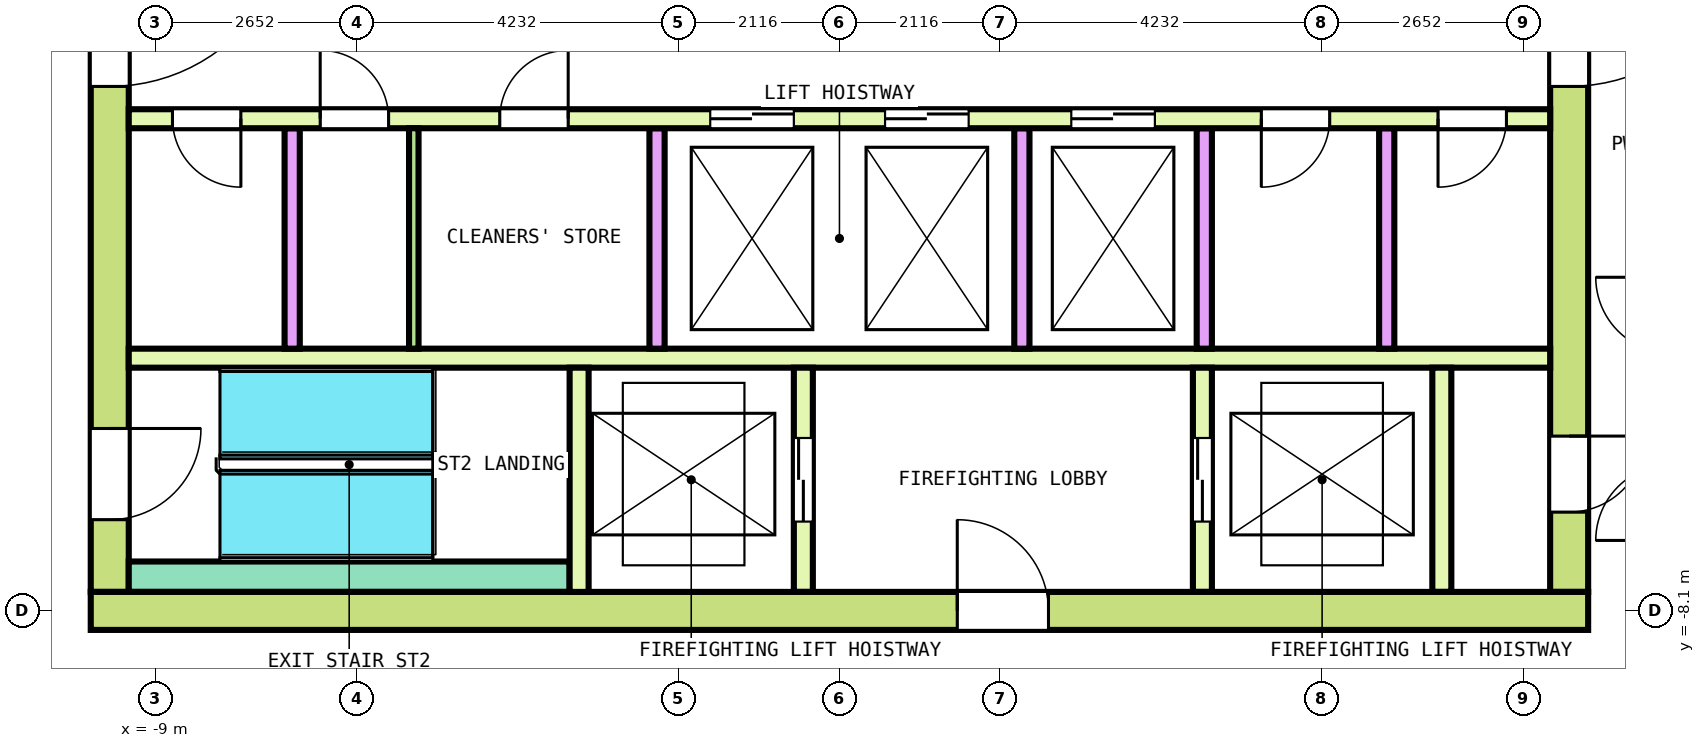
"""IFC4 building model, lengths in metres.
Left out: names, types, materials, properties, quantities, classifications, styles, units other than length and angle.
Written with IfcOpenShell. Run it as: python <this file> out.ifc"""

import sys

from ifc_helpers import new_model, si_unit, direction, frame, frame_2d, origin, place, context, subcontext, project, spatial, rectangle, extrude, element, fill, save


model = new_model("IFC4")
c1 = context("Model", 3, precision=1e-05, world=origin(), true_north=direction((0.0, 1.0)))
c2 = subcontext(c1, "Body", "Model", "MODEL_VIEW")
j1 = project(units=[si_unit("LENGTHUNIT", "METRE"), si_unit("PLANEANGLEUNIT", "RADIAN")], contexts=[c1])
p1 = place(None, origin())
s1 = spatial("IfcSite", under=j1, at=p1, CompositionType="ELEMENT")
p2 = place(p1, origin())
s2 = spatial("IfcBuilding", under=s1, at=p2, CompositionType="ELEMENT")
p3 = place(p2, frame((0.0, 0.0, 267.0)))
s3 = spatial("IfcBuildingStorey", under=s2, at=p3, CompositionType="ELEMENT", Elevation=267.0)
p4 = place(p3, frame((-9.85, -8.1, 0.0), z_axis=(0.0, 0.0, 1.0), x_axis=(1.0, 0.0, 0.0)))
e1 = element("IfcWall", 1, at=p4, inside=s3, PredefinedType="SHEAR", context=c2, shape_type="SweptSolid", body=[
    extrude(rectangle(XDim=19.7, YDim=0.5, at=frame_2d((9.85, 0.0))), origin(), (0.0, 0.0, 1.0), 3.7),
])
p5 = place(p4, frame((11.4, 0.0, 0.0)))
e2 = element("IfcOpeningElement", 2, at=p5, cuts=e1, PredefinedType="OPENING", context=c2, shape_type="SweptSolid", body=[
    extrude(rectangle(XDim=1.2, YDim=2.1, at=frame_2d((0.6, 1.05))), frame((0.0, 0.26, 0.0), z_axis=(0.0, -1.0, 0.0), x_axis=(1.0, 0.0, 0.0)), (0.0, 0.0, 1.0), 0.52),
])
p6 = place(p3, frame((-9.6, -7.85, 0.0), z_axis=(0.0, 0.0, 1.0), x_axis=(0.0, 1.0, 0.0)))
e3 = element("IfcWall", 3, at=p6, inside=s3, PredefinedType="SHEAR", context=c2, shape_type="SweptSolid", body=[
    extrude(rectangle(XDim=15.7, YDim=0.5, at=frame_2d((7.85, 0.0))), origin(), (0.0, 0.0, 1.0), 3.7),
])
p7 = place(p6, frame((6.65, 0.0, 0.0)))
e4 = element("IfcOpeningElement", 4, at=p7, cuts=e3, PredefinedType="OPENING", context=c2, shape_type="SweptSolid", body=[
    extrude(rectangle(XDim=2.4, YDim=2.1, at=frame_2d((1.2, 1.05))), frame((0.0, 0.26, 0.0), z_axis=(0.0, -1.0, 0.0), x_axis=(1.0, 0.0, 0.0)), (0.0, 0.0, 1.0), 0.52),
])
p8 = place(p6, frame((13.55, 0.0, 0.0)))
e5 = element("IfcOpeningElement", 5, at=p8, cuts=e3, PredefinedType="OPENING", context=c2, shape_type="SweptSolid", body=[
    extrude(rectangle(XDim=1.2, YDim=2.1, at=frame_2d((0.6, 1.05))), frame((0.0, 0.26, 0.0), z_axis=(0.0, -1.0, 0.0), x_axis=(1.0, 0.0, 0.0)), (0.0, 0.0, 1.0), 0.52),
])
p9 = place(p6, frame((0.95, 0.0, 0.0)))
e6 = element("IfcOpeningElement", 6, at=p9, cuts=e3, PredefinedType="OPENING", context=c2, shape_type="SweptSolid", body=[
    extrude(rectangle(XDim=1.2, YDim=2.1, at=frame_2d((0.6, 1.05))), frame((0.0, 0.26, 0.0), z_axis=(0.0, -1.0, 0.0), x_axis=(1.0, 0.0, 0.0)), (0.0, 0.0, 1.0), 0.52),
])
p10 = place(p3, frame((9.6, -7.85, 0.0), z_axis=(0.0, 0.0, 1.0), x_axis=(0.0, 1.0, 0.0)))
e7 = element("IfcWall", 7, at=p10, inside=s3, PredefinedType="SHEAR", context=c2, shape_type="SweptSolid", body=[
    extrude(rectangle(XDim=15.7, YDim=0.5, at=frame_2d((7.85, 0.0))), origin(), (0.0, 0.0, 1.0), 3.7),
])
p11 = place(p10, frame((6.65, 0.0, 0.0)))
e8 = element("IfcOpeningElement", 8, at=p11, cuts=e7, PredefinedType="OPENING", context=c2, shape_type="SweptSolid", body=[
    extrude(rectangle(XDim=2.4, YDim=2.1, at=frame_2d((1.2, 1.05))), frame((0.0, 0.26, 0.0), z_axis=(0.0, -1.0, 0.0), x_axis=(1.0, 0.0, 0.0)), (0.0, 0.0, 1.0), 0.52),
])
p12 = place(p10, frame((13.55, 0.0, 0.0)))
e9 = element("IfcOpeningElement", 9, at=p12, cuts=e7, PredefinedType="OPENING", context=c2, shape_type="SweptSolid", body=[
    extrude(rectangle(XDim=1.2, YDim=2.1, at=frame_2d((0.6, 1.05))), frame((0.0, 0.26, 0.0), z_axis=(0.0, -1.0, 0.0), x_axis=(1.0, 0.0, 0.0)), (0.0, 0.0, 1.0), 0.52),
])
p13 = place(p10, frame((1.05, 0.0, 0.0)))
e10 = element("IfcOpeningElement", 10, at=p13, cuts=e7, PredefinedType="OPENING", context=c2, shape_type="SweptSolid", body=[
    extrude(rectangle(XDim=1.0, YDim=2.1, at=frame_2d((0.5, 1.05))), frame((0.0, 0.26, 0.0), z_axis=(0.0, -1.0, 0.0), x_axis=(1.0, 0.0, 0.0)), (0.0, 0.0, 1.0), 0.52),
])
p14 = place(p3, frame((-9.35, -1.625, 0.0), z_axis=(0.0, 0.0, 1.0), x_axis=(1.0, 0.0, 0.0)))
e11 = element("IfcWall", 11, at=p14, inside=s3, PredefinedType="SOLIDWALL", context=c2, shape_type="SweptSolid", body=[
    extrude(rectangle(XDim=18.7, YDim=0.25, at=frame_2d((9.35, 0.0))), origin(), (0.0, 0.0, 1.0), 3.7),
])
p15 = place(p14, frame((7.65, 0.0, 0.0)))
e12 = element("IfcOpeningElement", 12, at=p15, cuts=e11, PredefinedType="OPENING", context=c2, shape_type="SweptSolid", body=[
    extrude(rectangle(XDim=1.1, YDim=2.1, at=frame_2d((0.55, 1.05))), frame((0.0, 0.135, 0.0), z_axis=(0.0, -1.0, 0.0), x_axis=(1.0, 0.0, 0.0)), (0.0, 0.0, 1.0), 0.27),
])
p16 = place(p14, frame((9.95, 0.0, 0.0)))
e13 = element("IfcOpeningElement", 13, at=p16, cuts=e11, PredefinedType="OPENING", context=c2, shape_type="SweptSolid", body=[
    extrude(rectangle(XDim=1.1, YDim=2.1, at=frame_2d((0.55, 1.05))), frame((0.0, 0.135, 0.0), z_axis=(0.0, -1.0, 0.0), x_axis=(1.0, 0.0, 0.0)), (0.0, 0.0, 1.0), 0.27),
])
p17 = place(p14, frame((12.4, 0.0, 0.0)))
e14 = element("IfcOpeningElement", 14, at=p17, cuts=e11, PredefinedType="OPENING", context=c2, shape_type="SweptSolid", body=[
    extrude(rectangle(XDim=1.1, YDim=2.1, at=frame_2d((0.55, 1.05))), frame((0.0, 0.135, 0.0), z_axis=(0.0, -1.0, 0.0), x_axis=(1.0, 0.0, 0.0)), (0.0, 0.0, 1.0), 0.27),
])
p18 = place(p14, frame((0.575, 0.0, 0.0)))
e15 = element("IfcOpeningElement", 15, at=p18, cuts=e11, PredefinedType="OPENING", context=c2, shape_type="SweptSolid", body=[
    extrude(rectangle(XDim=0.9, YDim=2.1, at=frame_2d((0.45, 1.05))), frame((0.0, 0.135, 0.0), z_axis=(0.0, -1.0, 0.0), x_axis=(1.0, 0.0, 0.0)), (0.0, 0.0, 1.0), 0.27),
])
p19 = place(p14, frame((2.519, 0.0, 0.0)))
e16 = element("IfcOpeningElement", 16, at=p19, cuts=e11, PredefinedType="OPENING", context=c2, shape_type="SweptSolid", body=[
    extrude(rectangle(XDim=0.9, YDim=2.1, at=frame_2d((0.45, 1.05))), frame((0.0, 0.135, 0.0), z_axis=(0.0, -1.0, 0.0), x_axis=(1.0, 0.0, 0.0)), (0.0, 0.0, 1.0), 0.27),
])
p20 = place(p14, frame((4.881, 0.0, 0.0)))
e17 = element("IfcOpeningElement", 17, at=p20, cuts=e11, PredefinedType="OPENING", context=c2, shape_type="SweptSolid", body=[
    extrude(rectangle(XDim=0.9, YDim=2.1, at=frame_2d((0.45, 1.05))), frame((0.0, 0.135, 0.0), z_axis=(0.0, -1.0, 0.0), x_axis=(1.0, 0.0, 0.0)), (0.0, 0.0, 1.0), 0.27),
])
p21 = place(p14, frame((14.9, 0.0, 0.0)))
e18 = element("IfcOpeningElement", 18, at=p21, cuts=e11, PredefinedType="OPENING", context=c2, shape_type="SweptSolid", body=[
    extrude(rectangle(XDim=0.9, YDim=2.1, at=frame_2d((0.45, 1.05))), frame((0.0, 0.135, 0.0), z_axis=(0.0, -1.0, 0.0), x_axis=(1.0, 0.0, 0.0)), (0.0, 0.0, 1.0), 0.27),
])
p22 = place(p14, frame((17.225, 0.0, 0.0)))
e19 = element("IfcOpeningElement", 19, at=p22, cuts=e11, PredefinedType="OPENING", context=c2, shape_type="SweptSolid", body=[
    extrude(rectangle(XDim=0.9, YDim=2.1, at=frame_2d((0.45, 1.05))), frame((0.0, 0.135, 0.0), z_axis=(0.0, -1.0, 0.0), x_axis=(1.0, 0.0, 0.0)), (0.0, 0.0, 1.0), 0.27),
])
p23 = place(p3, frame((-9.35, -4.775, 0.0), z_axis=(0.0, 0.0, 1.0), x_axis=(1.0, 0.0, 0.0)))
e20 = element("IfcWall", 20, at=p23, inside=s3, PredefinedType="SOLIDWALL", context=c2, shape_type="SweptSolid", body=[
    extrude(rectangle(XDim=18.7, YDim=0.25, at=frame_2d((9.35, 0.0))), origin(), (0.0, 0.0, 1.0), 3.7),
])
for number, where, z_axis, x_axis in (
    (21, (-7.2, -4.65, 0.0), (0.0, 0.0, 1.0), (0.0, 1.0, 0.0)),
    (22, (-2.4, -4.65, 0.0), (0.0, 0.0, 1.0), (0.0, 1.0, 0.0)),
    (23, (2.4, -4.65, 0.0), (0.0, 0.0, 1.0), (0.0, 1.0, 0.0)),
    (24, (4.8, -4.65, 0.0), (0.0, 0.0, 1.0), (0.0, 1.0, 0.0)),
    (25, (7.2, -4.65, 0.0), (0.0, 0.0, 1.0), (0.0, 1.0, 0.0)),
):
    element("IfcWall", number, at=place(p3, frame(where, z_axis=z_axis, x_axis=x_axis)), inside=s3, PredefinedType="SOLIDWALL", context=c2, shape_type="SweptSolid", body=[
        extrude(rectangle(XDim=2.9, YDim=0.2, at=frame_2d((1.45, 0.0))), origin(), (0.0, 0.0, 1.0), 3.7),
    ])
p24 = place(p3, frame((-9.35, -7.65, 0.0), z_axis=(0.0, 0.0, 1.0), x_axis=(1.0, 0.0, 0.0)))
e26 = element("IfcWall", 26, at=p24, inside=s3, PredefinedType="SOLIDWALL", context=c2, shape_type="SweptSolid", body=[
    extrude(rectangle(XDim=5.8, YDim=0.4, at=frame_2d((2.9, 0.0))), origin(), (0.0, 0.0, 1.0), 3.7),
])
p25 = place(p3, frame((-3.425, -7.85, 0.0), z_axis=(0.0, 0.0, 1.0), x_axis=(0.0, 1.0, 0.0)))
e27 = element("IfcWall", 27, at=p25, inside=s3, PredefinedType="SOLIDWALL", context=c2, shape_type="SweptSolid", body=[
    extrude(rectangle(XDim=2.95, YDim=0.25, at=frame_2d((1.475, 0.0))), origin(), (0.0, 0.0, 1.0), 3.7),
])
p26 = place(p3, frame((-0.475, -7.85, 0.0), z_axis=(0.0, 0.0, 1.0), x_axis=(0.0, 1.0, 0.0)))
e28 = element("IfcWall", 28, at=p26, inside=s3, PredefinedType="SOLIDWALL", context=c2, shape_type="SweptSolid", body=[
    extrude(rectangle(XDim=2.95, YDim=0.25, at=frame_2d((1.475, 0.0))), origin(), (0.0, 0.0, 1.0), 3.7),
])
p27 = place(p26, frame((0.925, 0.0, 0.0)))
e29 = element("IfcOpeningElement", 29, at=p27, cuts=e28, PredefinedType="OPENING", context=c2, shape_type="SweptSolid", body=[
    extrude(rectangle(XDim=1.1, YDim=2.1, at=frame_2d((0.55, 1.05))), frame((0.0, 0.135, 0.0), z_axis=(0.0, -1.0, 0.0), x_axis=(1.0, 0.0, 0.0)), (0.0, 0.0, 1.0), 0.27),
])
p28 = place(p3, frame((4.775, -7.85, 0.0), z_axis=(0.0, 0.0, 1.0), x_axis=(0.0, 1.0, 0.0)))
e30 = element("IfcWall", 30, at=p28, inside=s3, PredefinedType="SOLIDWALL", context=c2, shape_type="SweptSolid", body=[
    extrude(rectangle(XDim=2.95, YDim=0.25, at=frame_2d((1.475, 0.0))), origin(), (0.0, 0.0, 1.0), 3.7),
])
p29 = place(p28, frame((0.925, 0.0, 0.0)))
e31 = element("IfcOpeningElement", 31, at=p29, cuts=e30, PredefinedType="OPENING", context=c2, shape_type="SweptSolid", body=[
    extrude(rectangle(XDim=1.1, YDim=2.1, at=frame_2d((0.55, 1.05))), frame((0.0, 0.135, 0.0), z_axis=(0.0, -1.0, 0.0), x_axis=(1.0, 0.0, 0.0)), (0.0, 0.0, 1.0), 0.27),
])
p30 = place(p3, frame((7.925, -7.85, 0.0), z_axis=(0.0, 0.0, 1.0), x_axis=(0.0, 1.0, 0.0)))
e32 = element("IfcWall", 32, at=p30, inside=s3, PredefinedType="SOLIDWALL", context=c2, shape_type="SweptSolid", body=[
    extrude(rectangle(XDim=2.95, YDim=0.25, at=frame_2d((1.475, 0.0))), origin(), (0.0, 0.0, 1.0), 3.7),
])
p31 = place(p3, frame((-5.6, -4.65, 0.0), z_axis=(0.0, 0.0, 1.0), x_axis=(0.0, 1.0, 0.0)))
e33 = element("IfcWall", 33, at=p31, inside=s3, PredefinedType="PARTITIONING", context=c2, shape_type="SweptSolid", body=[
    extrude(rectangle(XDim=2.9, YDim=0.125, at=frame_2d((1.45, 0.0))), origin(), (0.0, 0.0, 1.0), 3.7),
])
p32 = place(p15, origin())
e34 = element("IfcDoor", 34, at=p32, inside=s3, OperationType="DOUBLE_DOOR_SLIDING", PredefinedType="DOOR", context=c2, shape_type="SweptSolid", body=[
    extrude(rectangle(XDim=1.1, YDim=2.1, at=frame_2d((0.55, 1.05))), frame((0.0, 0.075, 0.0), z_axis=(0.0, -1.0, 0.0), x_axis=(1.0, 0.0, 0.0)), (0.0, 0.0, 1.0), 0.15),
])
fill(e12, e34)
p33 = place(p16, origin())
e35 = element("IfcDoor", 35, at=p33, inside=s3, OperationType="DOUBLE_DOOR_SLIDING", PredefinedType="DOOR", context=c2, shape_type="SweptSolid", body=[
    extrude(rectangle(XDim=1.1, YDim=2.1, at=frame_2d((0.55, 1.05))), frame((0.0, 0.075, 0.0), z_axis=(0.0, -1.0, 0.0), x_axis=(1.0, 0.0, 0.0)), (0.0, 0.0, 1.0), 0.15),
])
fill(e13, e35)
p34 = place(p17, origin())
e36 = element("IfcDoor", 36, at=p34, inside=s3, OperationType="DOUBLE_DOOR_SLIDING", PredefinedType="DOOR", context=c2, shape_type="SweptSolid", body=[
    extrude(rectangle(XDim=1.1, YDim=2.1, at=frame_2d((0.55, 1.05))), frame((0.0, 0.075, 0.0), z_axis=(0.0, -1.0, 0.0), x_axis=(1.0, 0.0, 0.0)), (0.0, 0.0, 1.0), 0.15),
])
fill(e14, e36)
p35 = place(p27, origin())
e37 = element("IfcDoor", 37, at=p35, inside=s3, OperationType="DOUBLE_DOOR_SLIDING", PredefinedType="DOOR", context=c2, shape_type="SweptSolid", body=[
    extrude(rectangle(XDim=1.1, YDim=2.1, at=frame_2d((0.55, 1.05))), frame((0.0, 0.075, 0.0), z_axis=(0.0, -1.0, 0.0), x_axis=(1.0, 0.0, 0.0)), (0.0, 0.0, 1.0), 0.15),
])
fill(e29, e37)
p36 = place(p29, origin())
e38 = element("IfcDoor", 38, at=p36, inside=s3, OperationType="DOUBLE_DOOR_SLIDING", PredefinedType="DOOR", context=c2, shape_type="SweptSolid", body=[
    extrude(rectangle(XDim=1.1, YDim=2.1, at=frame_2d((0.55, 1.05))), frame((0.0, 0.075, 0.0), z_axis=(0.0, -1.0, 0.0), x_axis=(1.0, 0.0, 0.0)), (0.0, 0.0, 1.0), 0.15),
])
fill(e31, e38)
p37 = place(p7, origin())
e39 = element("IfcDoor", 39, at=p37, inside=s3, OperationType="DOUBLE_DOOR_SINGLE_SWING", PredefinedType="DOOR", context=c2, shape_type="SweptSolid", body=[
    extrude(rectangle(XDim=2.4, YDim=2.1, at=frame_2d((1.2, 1.05))), frame((0.0, 0.2, 0.0), z_axis=(0.0, -1.0, 0.0), x_axis=(1.0, 0.0, 0.0)), (0.0, 0.0, 1.0), 0.4),
])
fill(e4, e39)
p38 = place(p11, origin())
e40 = element("IfcDoor", 40, at=p38, inside=s3, OperationType="DOUBLE_DOOR_SINGLE_SWING", PredefinedType="DOOR", context=c2, shape_type="SweptSolid", body=[
    extrude(rectangle(XDim=2.4, YDim=2.1, at=frame_2d((1.2, 1.05))), frame((0.0, 0.2, 0.0), z_axis=(0.0, -1.0, 0.0), x_axis=(1.0, 0.0, 0.0)), (0.0, 0.0, 1.0), 0.4),
])
fill(e8, e40)
p39 = place(p9, origin())
e41 = element("IfcDoor", 41, at=p39, inside=s3, OperationType="SINGLE_SWING_LEFT", PredefinedType="DOOR", context=c2, shape_type="SweptSolid", body=[
    extrude(rectangle(XDim=1.2, YDim=2.1, at=frame_2d((0.6, 1.05))), frame((0.0, 0.2, 0.0), z_axis=(0.0, -1.0, 0.0), x_axis=(1.0, 0.0, 0.0)), (0.0, 0.0, 1.0), 0.4),
])
fill(e6, e41)
p40 = place(p5, origin())
e42 = element("IfcDoor", 42, at=p40, inside=s3, OperationType="SINGLE_SWING_LEFT", PredefinedType="DOOR", context=c2, shape_type="SweptSolid", body=[
    extrude(rectangle(XDim=1.2, YDim=2.1, at=frame_2d((0.6, 1.05))), frame((0.0, 0.2, 0.0), z_axis=(0.0, -1.0, 0.0), x_axis=(1.0, 0.0, 0.0)), (0.0, 0.0, 1.0), 0.4),
])
fill(e2, e42)
p41 = place(p13, origin())
e43 = element("IfcDoor", 43, at=p41, inside=s3, OperationType="SINGLE_SWING_LEFT", PredefinedType="DOOR", context=c2, shape_type="SweptSolid", body=[
    extrude(rectangle(XDim=1.0, YDim=2.1, at=frame_2d((0.5, 1.05))), frame((0.0, 0.2, 0.0), z_axis=(0.0, -1.0, 0.0), x_axis=(1.0, 0.0, 0.0)), (0.0, 0.0, 1.0), 0.4),
])
fill(e10, e43)
p42 = place(p18, origin())
e44 = element("IfcDoor", 44, at=p42, inside=s3, OperationType="SINGLE_SWING_LEFT", PredefinedType="DOOR", context=c2, shape_type="SweptSolid", body=[
    extrude(rectangle(XDim=0.9, YDim=2.1, at=frame_2d((0.45, 1.05))), frame((0.0, 0.075, 0.0), z_axis=(0.0, -1.0, 0.0), x_axis=(1.0, 0.0, 0.0)), (0.0, 0.0, 1.0), 0.15),
])
fill(e15, e44)
p43 = place(p19, origin())
e45 = element("IfcDoor", 45, at=p43, inside=s3, OperationType="SINGLE_SWING_RIGHT", PredefinedType="DOOR", context=c2, shape_type="SweptSolid", body=[
    extrude(rectangle(XDim=0.9, YDim=2.1, at=frame_2d((0.45, 1.05))), frame((0.0, 0.075, 0.0), z_axis=(0.0, -1.0, 0.0), x_axis=(1.0, 0.0, 0.0)), (0.0, 0.0, 1.0), 0.15),
])
fill(e16, e45)
p44 = place(p20, origin())
e46 = element("IfcDoor", 46, at=p44, inside=s3, OperationType="SINGLE_SWING_LEFT", PredefinedType="DOOR", context=c2, shape_type="SweptSolid", body=[
    extrude(rectangle(XDim=0.9, YDim=2.1, at=frame_2d((0.45, 1.05))), frame((0.0, 0.075, 0.0), z_axis=(0.0, -1.0, 0.0), x_axis=(1.0, 0.0, 0.0)), (0.0, 0.0, 1.0), 0.15),
])
fill(e17, e46)
p45 = place(p21, origin())
e47 = element("IfcDoor", 47, at=p45, inside=s3, OperationType="SINGLE_SWING_RIGHT", PredefinedType="DOOR", context=c2, shape_type="SweptSolid", body=[
    extrude(rectangle(XDim=0.9, YDim=2.1, at=frame_2d((0.45, 1.05))), frame((0.0, 0.075, 0.0), z_axis=(0.0, -1.0, 0.0), x_axis=(1.0, 0.0, 0.0)), (0.0, 0.0, 1.0), 0.15),
])
fill(e18, e47)
p46 = place(p22, origin())
e48 = element("IfcDoor", 48, at=p46, inside=s3, OperationType="SINGLE_SWING_LEFT", PredefinedType="DOOR", context=c2, shape_type="SweptSolid", body=[
    extrude(rectangle(XDim=0.9, YDim=2.1, at=frame_2d((0.45, 1.05))), frame((0.0, 0.075, 0.0), z_axis=(0.0, -1.0, 0.0), x_axis=(1.0, 0.0, 0.0)), (0.0, 0.0, 1.0), 0.15),
])
fill(e19, e48)
save(model, sys.argv[1])
